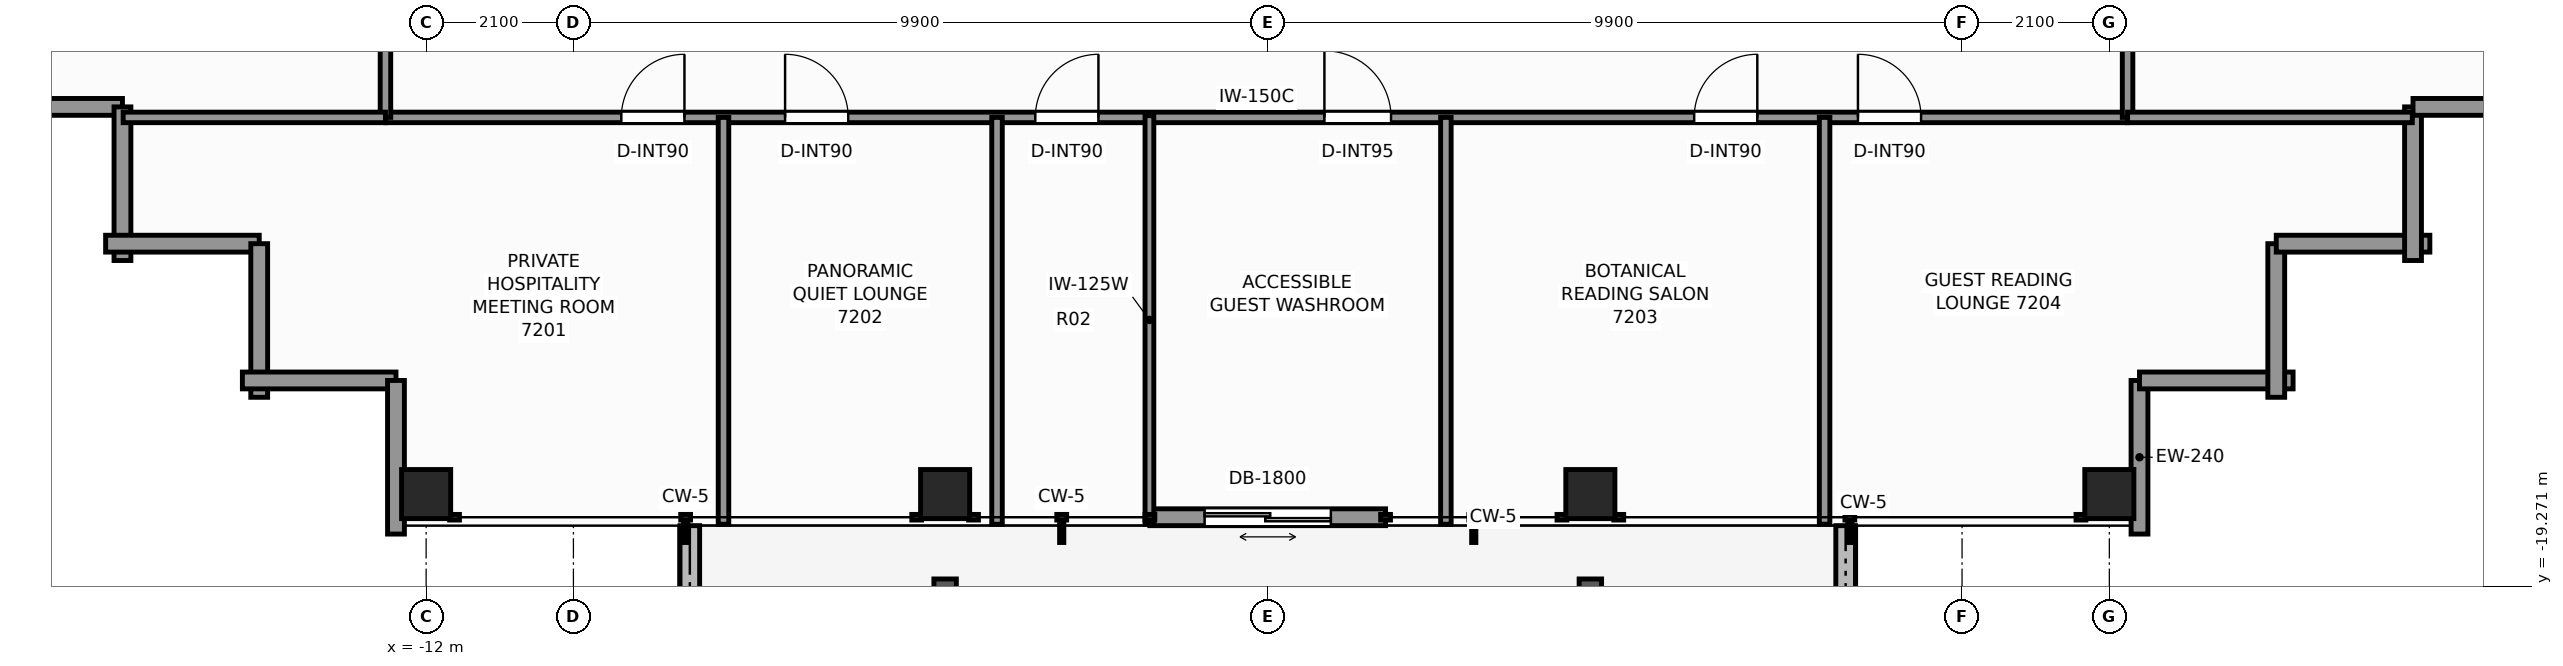
"""IFC4 building model, lengths in metres.
Left out: names, types, materials, properties, quantities, classifications, styles, units other than length and angle.
Written with IfcOpenShell. Run it as: python <this file> out.ifc"""

import sys

from ifc_helpers import new_model, si_unit, direction, frame, frame_2d, origin, origin_2d, place, context, subcontext, project, spatial, rectangle, extrude, element, fill, save


model = new_model("IFC4")
c1 = context("Model", 3, precision=1e-05, world=origin(), true_north=direction((0.0, 1.0)))
c2 = subcontext(c1, "Body", "Model", "MODEL_VIEW")
j1 = project(units=[si_unit("LENGTHUNIT", "METRE"), si_unit("PLANEANGLEUNIT", "RADIAN")], contexts=[c1])
p1 = place(None, origin())
s1 = spatial("IfcSite", under=j1, at=p1, CompositionType="ELEMENT")
p2 = place(p1, origin())
s2 = spatial("IfcBuilding", under=s1, at=p2, CompositionType="ELEMENT")
p3 = place(p2, frame((0.0, 0.0, 247.9)))
s3 = spatial("IfcBuildingStorey", under=s2, at=p3, CompositionType="ELEMENT", Elevation=247.9)
for number, where, z_axis, x_axis in (
    (1, (-12.0, -17.95, 0.0), (0.0, 0.0, 1.0), (1.0, 0.0, 0.0)),
    (2, (-4.6, -17.95, 0.0), (0.0, 0.0, 1.0), (1.0, 0.0, 0.0)),
    (3, (4.6, -17.95, 0.0), (0.0, 0.0, 1.0), (1.0, 0.0, 0.0)),
    (4, (12.0, -17.95, 0.0), (0.0, 0.0, 1.0), (1.0, 0.0, 0.0)),
):
    element("IfcColumn", number, at=place(p3, frame(where, z_axis=z_axis, x_axis=x_axis)), inside=s3, PredefinedType="COLUMN", context=c2, shape_type="SweptSolid", body=[
        extrude(rectangle(XDim=0.7, YDim=0.7, at=origin_2d()), origin(), (0.0, 0.0, 1.0), 3.5),
    ])
p4 = place(p3, frame((8.24, -21.074, -0.07), z_axis=(0.0, 0.0, 1.0), x_axis=(0.0, 1.0, 0.0)))
e5 = element("IfcWall", 5, at=p4, inside=s3, PredefinedType="PARAPET", context=c2, shape_type="SweptSolid", body=[
    extrude(rectangle(XDim=2.674, YDim=0.28, at=frame_2d((1.337, 0.0))), origin(), (0.0, 0.0, 1.0), 0.42),
])
p5 = place(p3, frame((-8.24, -18.4, -0.07), z_axis=(0.0, 0.0, 1.0), x_axis=(0.0, -1.0, 0.0)))
e6 = element("IfcWall", 6, at=p5, inside=s3, PredefinedType="PARAPET", context=c2, shape_type="SweptSolid", body=[
    extrude(rectangle(XDim=1.466, YDim=0.28, at=frame_2d((0.733, 0.0))), origin(), (0.0, 0.0, 1.0), 0.42),
])
p6 = place(p3, frame((1.68, -18.28, 0.0), z_axis=(0.0, 0.0, 1.0), x_axis=(-1.0, 0.0, 0.0)))
e7 = element("IfcWall", 7, at=p6, inside=s3, PredefinedType="STANDARD", context=c2, shape_type="SweptSolid", body=[
    extrude(rectangle(XDim=3.36, YDim=0.24, at=frame_2d((1.68, 0.0))), origin(), (0.0, 0.0, 1.0), 3.25),
])
p7 = place(p6, frame((0.78, 0.0, 0.0)))
e8 = element("IfcOpeningElement", 8, at=p7, cuts=e7, PredefinedType="OPENING", context=c2, shape_type="SweptSolid", body=[
    extrude(rectangle(XDim=1.8, YDim=2.2, at=frame_2d((0.9, 1.1))), frame((0.0, 0.13, 0.0), z_axis=(0.0, -1.0, 0.0), x_axis=(1.0, 0.0, 0.0)), (0.0, 0.0, 1.0), 0.26),
])
p8 = place(p3, frame((12.43, -16.33, 0.0), z_axis=(0.0, 0.0, 1.0), x_axis=(0.0, -1.0, 0.0)))
e9 = element("IfcWall", 9, at=p8, inside=s3, PredefinedType="STANDARD", context=c2, shape_type="SweptSolid", body=[
    extrude(rectangle(XDim=2.19, YDim=0.24, at=frame_2d((1.095, 0.0))), origin(), (0.0, 0.0, 1.0), 2.633),
])
for number, where, z_axis, x_axis in (
    (10, (14.62, -16.33, 0.0), (0.0, 0.0, 1.0), (-1.0, 0.0, 0.0)),
    (11, (14.38, -14.38, 0.0), (0.0, 0.0, 1.0), (0.0, -1.0, 0.0)),
    (12, (16.57, -14.38, 0.0), (0.0, 0.0, 1.0), (-1.0, 0.0, 0.0)),
    (13, (16.33, -12.43, 0.0), (0.0, 0.0, 1.0), (0.0, -1.0, 0.0)),
):
    element("IfcWall", number, at=place(p3, frame(where, z_axis=z_axis, x_axis=x_axis)), inside=s3, PredefinedType="STANDARD", context=c2, shape_type="SweptSolid", body=[
        extrude(rectangle(XDim=2.19, YDim=0.24, at=frame_2d((1.095, 0.0))), origin(), (0.0, 0.0, 1.0), 2.633),
    ])
for number, where, z_axis, x_axis in (
    (14, (18.52, -12.43, 0.0), (0.0, 0.0, 1.0), (-1.0, 0.0, 0.0)),
    (15, (-16.33, -12.43, 0.0), (0.0, 0.0, 1.0), (-1.0, 0.0, 0.0)),
):
    element("IfcWall", number, at=place(p3, frame(where, z_axis=z_axis, x_axis=x_axis)), inside=s3, PredefinedType="STANDARD", context=c2, shape_type="SweptSolid", body=[
        extrude(rectangle(XDim=2.19, YDim=0.24, at=frame_2d((1.095, 0.0))), origin(), (0.0, 0.0, 1.0), 2.633),
    ])
for number, where, z_axis, x_axis in (
    (16, (-16.33, -14.62, 0.0), (0.0, 0.0, 1.0), (0.0, 1.0, 0.0)),
    (17, (-14.38, -14.38, 0.0), (0.0, 0.0, 1.0), (-1.0, 0.0, 0.0)),
    (18, (-14.38, -16.57, 0.0), (0.0, 0.0, 1.0), (0.0, 1.0, 0.0)),
    (19, (-12.43, -16.33, 0.0), (0.0, 0.0, 1.0), (-1.0, 0.0, 0.0)),
):
    element("IfcWall", number, at=place(p3, frame(where, z_axis=z_axis, x_axis=x_axis)), inside=s3, PredefinedType="STANDARD", context=c2, shape_type="SweptSolid", body=[
        extrude(rectangle(XDim=2.19, YDim=0.24, at=frame_2d((1.095, 0.0))), origin(), (0.0, 0.0, 1.0), 2.633),
    ])
p9 = place(p3, frame((-12.43, -18.52, 0.0), z_axis=(0.0, 0.0, 1.0), x_axis=(0.0, 1.0, 0.0)))
e20 = element("IfcWall", 20, at=p9, inside=s3, PredefinedType="STANDARD", context=c2, shape_type="SweptSolid", body=[
    extrude(rectangle(XDim=2.19, YDim=0.24, at=frame_2d((1.095, 0.0))), origin(), (0.0, 0.0, 1.0), 2.633),
])
p10 = place(p3, frame((-12.58, -12.58, 0.0), z_axis=(0.0, 0.0, 1.0), x_axis=(1.0, 0.0, 0.0)))
e21 = element("IfcWall", 21, at=p10, inside=s3, PredefinedType="PARTITIONING", context=c2, shape_type="SweptSolid", body=[
    extrude(rectangle(XDim=24.84, YDim=0.15, at=frame_2d((12.42, 0.0))), origin(), (0.0, 0.0, 1.0), 2.539),
])
p11 = place(p10, frame((3.363, 0.0, 0.0)))
e22 = element("IfcOpeningElement", 22, at=p11, cuts=e21, PredefinedType="OPENING", context=c2, shape_type="SweptSolid", body=[
    extrude(rectangle(XDim=0.9, YDim=2.06, at=frame_2d((0.45, 1.03))), frame((0.0, 0.085, 0.0), z_axis=(0.0, -1.0, 0.0), x_axis=(1.0, 0.0, 0.0)), (0.0, 0.0, 1.0), 0.17),
])
p12 = place(p10, frame((5.698, 0.0, 0.0)))
e23 = element("IfcOpeningElement", 23, at=p12, cuts=e21, PredefinedType="OPENING", context=c2, shape_type="SweptSolid", body=[
    extrude(rectangle(XDim=0.9, YDim=2.06, at=frame_2d((0.45, 1.03))), frame((0.0, 0.085, 0.0), z_axis=(0.0, -1.0, 0.0), x_axis=(1.0, 0.0, 0.0)), (0.0, 0.0, 1.0), 0.17),
])
p13 = place(p10, frame((9.266, 0.0, 0.0)))
e24 = element("IfcOpeningElement", 24, at=p13, cuts=e21, PredefinedType="OPENING", context=c2, shape_type="SweptSolid", body=[
    extrude(rectangle(XDim=0.9, YDim=2.06, at=frame_2d((0.45, 1.03))), frame((0.0, 0.085, 0.0), z_axis=(0.0, -1.0, 0.0), x_axis=(1.0, 0.0, 0.0)), (0.0, 0.0, 1.0), 0.17),
])
p14 = place(p10, frame((13.388, 0.0, 0.0)))
e25 = element("IfcOpeningElement", 25, at=p14, cuts=e21, PredefinedType="OPENING", context=c2, shape_type="SweptSolid", body=[
    extrude(rectangle(XDim=0.95, YDim=2.06, at=frame_2d((0.475, 1.03))), frame((0.0, 0.085, 0.0), z_axis=(0.0, -1.0, 0.0), x_axis=(1.0, 0.0, 0.0)), (0.0, 0.0, 1.0), 0.17),
])
p15 = place(p10, frame((18.661, 0.0, 0.0)))
e26 = element("IfcOpeningElement", 26, at=p15, cuts=e21, PredefinedType="OPENING", context=c2, shape_type="SweptSolid", body=[
    extrude(rectangle(XDim=0.9, YDim=2.06, at=frame_2d((0.45, 1.03))), frame((0.0, 0.085, 0.0), z_axis=(0.0, -1.0, 0.0), x_axis=(1.0, 0.0, 0.0)), (0.0, 0.0, 1.0), 0.17),
])
p16 = place(p10, frame((20.996, 0.0, 0.0)))
e27 = element("IfcOpeningElement", 27, at=p16, cuts=e21, PredefinedType="OPENING", context=c2, shape_type="SweptSolid", body=[
    extrude(rectangle(XDim=0.9, YDim=2.06, at=frame_2d((0.45, 1.03))), frame((0.0, 0.085, 0.0), z_axis=(0.0, -1.0, 0.0), x_axis=(1.0, 0.0, 0.0)), (0.0, 0.0, 1.0), 0.17),
])
p17 = place(p3, frame((-12.58, -12.58, 0.0), z_axis=(0.0, 0.0, 1.0), x_axis=(0.0, 1.0, 0.0)))
e28 = element("IfcWall", 28, at=p17, inside=s3, PredefinedType="PARTITIONING", context=c2, shape_type="SweptSolid", body=[
    extrude(rectangle(XDim=24.84, YDim=0.15, at=frame_2d((12.42, 0.0))), origin(), (0.0, 0.0, 1.0), 2.539),
])
p18 = place(p17, frame((3.104, 0.0, 0.0)))
e29 = element("IfcOpeningElement", 29, at=p18, cuts=e28, PredefinedType="OPENING", context=c2, shape_type="SweptSolid", body=[
    extrude(rectangle(XDim=0.9, YDim=2.06, at=frame_2d((0.45, 1.03))), frame((0.0, 0.085, 0.0), z_axis=(0.0, -1.0, 0.0), x_axis=(1.0, 0.0, 0.0)), (0.0, 0.0, 1.0), 0.17),
])
p19 = place(p17, frame((9.119, 0.0, 0.0)))
e30 = element("IfcOpeningElement", 30, at=p19, cuts=e28, PredefinedType="OPENING", context=c2, shape_type="SweptSolid", body=[
    extrude(rectangle(XDim=0.95, YDim=2.06, at=frame_2d((0.475, 1.03))), frame((0.0, 0.085, 0.0), z_axis=(0.0, -1.0, 0.0), x_axis=(1.0, 0.0, 0.0)), (0.0, 0.0, 1.0), 0.17),
])
p20 = place(p17, frame((14.5, 0.0, 0.0)))
e31 = element("IfcOpeningElement", 31, at=p20, cuts=e28, PredefinedType="OPENING", context=c2, shape_type="SweptSolid", body=[
    extrude(rectangle(XDim=0.95, YDim=2.06, at=frame_2d((0.475, 1.03))), frame((0.0, 0.085, 0.0), z_axis=(0.0, -1.0, 0.0), x_axis=(1.0, 0.0, 0.0)), (0.0, 0.0, 1.0), 0.17),
])
p21 = place(p17, frame((20.534, 0.0, 0.0)))
e32 = element("IfcOpeningElement", 32, at=p21, cuts=e28, PredefinedType="OPENING", context=c2, shape_type="SweptSolid", body=[
    extrude(rectangle(XDim=0.95, YDim=2.06, at=frame_2d((0.475, 1.03))), frame((0.0, 0.085, 0.0), z_axis=(0.0, -1.0, 0.0), x_axis=(1.0, 0.0, 0.0)), (0.0, 0.0, 1.0), 0.17),
])
p22 = place(p3, frame((12.26, -12.58, 0.0), z_axis=(0.0, 0.0, 1.0), x_axis=(0.0, 1.0, 0.0)))
e33 = element("IfcWall", 33, at=p22, inside=s3, PredefinedType="PARTITIONING", context=c2, shape_type="SweptSolid", body=[
    extrude(rectangle(XDim=24.84, YDim=0.15, at=frame_2d((12.42, 0.0))), origin(), (0.0, 0.0, 1.0), 2.539),
])
p23 = place(p22, frame((4.228, 0.0, 0.0)))
e34 = element("IfcOpeningElement", 34, at=p23, cuts=e33, PredefinedType="OPENING", context=c2, shape_type="SweptSolid", body=[
    extrude(rectangle(XDim=0.95, YDim=2.06, at=frame_2d((0.475, 1.03))), frame((0.0, 0.085, 0.0), z_axis=(0.0, -1.0, 0.0), x_axis=(1.0, 0.0, 0.0)), (0.0, 0.0, 1.0), 0.17),
])
p24 = place(p22, frame((14.135, 0.0, 0.0)))
e35 = element("IfcOpeningElement", 35, at=p24, cuts=e33, PredefinedType="OPENING", context=c2, shape_type="SweptSolid", body=[
    extrude(rectangle(XDim=0.95, YDim=2.06, at=frame_2d((0.475, 1.03))), frame((0.0, 0.085, 0.0), z_axis=(0.0, -1.0, 0.0), x_axis=(1.0, 0.0, 0.0)), (0.0, 0.0, 1.0), 0.17),
])
p25 = place(p22, frame((20.542, 0.0, 0.0)))
e36 = element("IfcOpeningElement", 36, at=p25, cuts=e33, PredefinedType="OPENING", context=c2, shape_type="SweptSolid", body=[
    extrude(rectangle(XDim=0.95, YDim=2.06, at=frame_2d((0.475, 1.03))), frame((0.0, 0.085, 0.0), z_axis=(0.0, -1.0, 0.0), x_axis=(1.0, 0.0, 0.0)), (0.0, 0.0, 1.0), 0.17),
])
p26 = place(p3, frame((-16.32, -12.58, 0.0), z_axis=(0.0, 0.0, 1.0), x_axis=(1.0, 0.0, 0.0)))
e37 = element("IfcWall", 37, at=p26, inside=s3, PredefinedType="PARTITIONING", context=c2, shape_type="SweptSolid", body=[
    extrude(rectangle(XDim=3.74, YDim=0.15, at=frame_2d((1.87, 0.0))), origin(), (0.0, 0.0, 1.0), 3.25),
])
p27 = place(p3, frame((12.26, -12.58, 0.0), z_axis=(0.0, 0.0, 1.0), x_axis=(1.0, 0.0, 0.0)))
e38 = element("IfcWall", 38, at=p27, inside=s3, PredefinedType="PARTITIONING", context=c2, shape_type="SweptSolid", body=[
    extrude(rectangle(XDim=4.06, YDim=0.15, at=frame_2d((2.03, 0.0))), origin(), (0.0, 0.0, 1.0), 3.25),
])
for number, where, z_axis, x_axis in (
    (39, (-7.76, -18.38, 0.0), (0.0, 0.0, 1.0), (0.0, 1.0, 0.0)),
    (40, (-3.86, -18.38, 0.0), (0.0, 0.0, 1.0), (0.0, 1.0, 0.0)),
    (41, (2.54, -18.38, 0.0), (0.0, 0.0, 1.0), (0.0, 1.0, 0.0)),
):
    element("IfcWall", number, at=place(p3, frame(where, z_axis=z_axis, x_axis=x_axis)), inside=s3, PredefinedType="PARTITIONING", context=c2, shape_type="SweptSolid", body=[
        extrude(rectangle(XDim=5.8, YDim=0.15, at=frame_2d((2.9, 0.0))), origin(), (0.0, 0.0, 1.0), 2.623),
    ])
p28 = place(p3, frame((-1.687, -18.38, 0.0), z_axis=(0.0, 0.0, 1.0), x_axis=(0.0, 1.0, 0.0)))
e42 = element("IfcWall", 42, at=p28, inside=s3, PredefinedType="PARTITIONING", context=c2, shape_type="SweptSolid", body=[
    extrude(rectangle(XDim=5.825, YDim=0.125, at=frame_2d((2.913, 0.0))), origin(), (0.0, 0.0, 1.0), 2.623),
])
p29 = place(p3, frame((7.94, -18.38, 0.0), z_axis=(0.0, 0.0, 1.0), x_axis=(0.0, 1.0, 0.0)))
e43 = element("IfcWall", 43, at=p29, inside=s3, PredefinedType="PARTITIONING", context=c2, shape_type="SweptSolid", body=[
    extrude(rectangle(XDim=5.8, YDim=0.15, at=frame_2d((2.9, 0.0))), origin(), (0.0, 0.0, 1.0), 2.623),
])
p30 = place(p7, origin())
e44 = element("IfcDoor", 44, at=p30, inside=s3, OperationType="DOUBLE_DOOR_SLIDING", PredefinedType="DOOR", context=c2, shape_type="SweptSolid", body=[
    extrude(rectangle(XDim=1.8, YDim=2.2, at=frame_2d((0.9, 1.1))), frame((0.0, 0.025, 0.0), z_axis=(0.0, -1.0, 0.0), x_axis=(1.0, 0.0, 0.0)), (0.0, 0.0, 1.0), 0.05),
])
fill(e8, e44)
p31 = place(p11, origin())
e45 = element("IfcDoor", 45, at=p31, inside=s3, OperationType="SINGLE_SWING_RIGHT", PredefinedType="DOOR", context=c2, shape_type="SweptSolid", body=[
    extrude(rectangle(XDim=0.9, YDim=2.06, at=frame_2d((0.45, 1.03))), frame((0.0, 0.025, 0.0), z_axis=(0.0, -1.0, 0.0), x_axis=(1.0, 0.0, 0.0)), (0.0, 0.0, 1.0), 0.05),
])
fill(e22, e45)
p32 = place(p12, origin())
e46 = element("IfcDoor", 46, at=p32, inside=s3, OperationType="SINGLE_SWING_LEFT", PredefinedType="DOOR", context=c2, shape_type="SweptSolid", body=[
    extrude(rectangle(XDim=0.9, YDim=2.06, at=frame_2d((0.45, 1.03))), frame((0.0, 0.025, 0.0), z_axis=(0.0, -1.0, 0.0), x_axis=(1.0, 0.0, 0.0)), (0.0, 0.0, 1.0), 0.05),
])
fill(e23, e46)
p33 = place(p13, origin())
e47 = element("IfcDoor", 47, at=p33, inside=s3, OperationType="SINGLE_SWING_RIGHT", PredefinedType="DOOR", context=c2, shape_type="SweptSolid", body=[
    extrude(rectangle(XDim=0.9, YDim=2.06, at=frame_2d((0.45, 1.03))), frame((0.0, 0.025, 0.0), z_axis=(0.0, -1.0, 0.0), x_axis=(1.0, 0.0, 0.0)), (0.0, 0.0, 1.0), 0.05),
])
fill(e24, e47)
p34 = place(p14, origin())
e48 = element("IfcDoor", 48, at=p34, inside=s3, OperationType="SINGLE_SWING_LEFT", PredefinedType="DOOR", context=c2, shape_type="SweptSolid", body=[
    extrude(rectangle(XDim=0.95, YDim=2.06, at=frame_2d((0.475, 1.03))), frame((0.0, 0.025, 0.0), z_axis=(0.0, -1.0, 0.0), x_axis=(1.0, 0.0, 0.0)), (0.0, 0.0, 1.0), 0.05),
])
fill(e25, e48)
p35 = place(p15, origin())
e49 = element("IfcDoor", 49, at=p35, inside=s3, OperationType="SINGLE_SWING_RIGHT", PredefinedType="DOOR", context=c2, shape_type="SweptSolid", body=[
    extrude(rectangle(XDim=0.9, YDim=2.06, at=frame_2d((0.45, 1.03))), frame((0.0, 0.025, 0.0), z_axis=(0.0, -1.0, 0.0), x_axis=(1.0, 0.0, 0.0)), (0.0, 0.0, 1.0), 0.05),
])
fill(e26, e49)
p36 = place(p16, origin())
e50 = element("IfcDoor", 50, at=p36, inside=s3, OperationType="SINGLE_SWING_LEFT", PredefinedType="DOOR", context=c2, shape_type="SweptSolid", body=[
    extrude(rectangle(XDim=0.9, YDim=2.06, at=frame_2d((0.45, 1.03))), frame((0.0, 0.025, 0.0), z_axis=(0.0, -1.0, 0.0), x_axis=(1.0, 0.0, 0.0)), (0.0, 0.0, 1.0), 0.05),
])
fill(e27, e50)
save(model, sys.argv[1])
